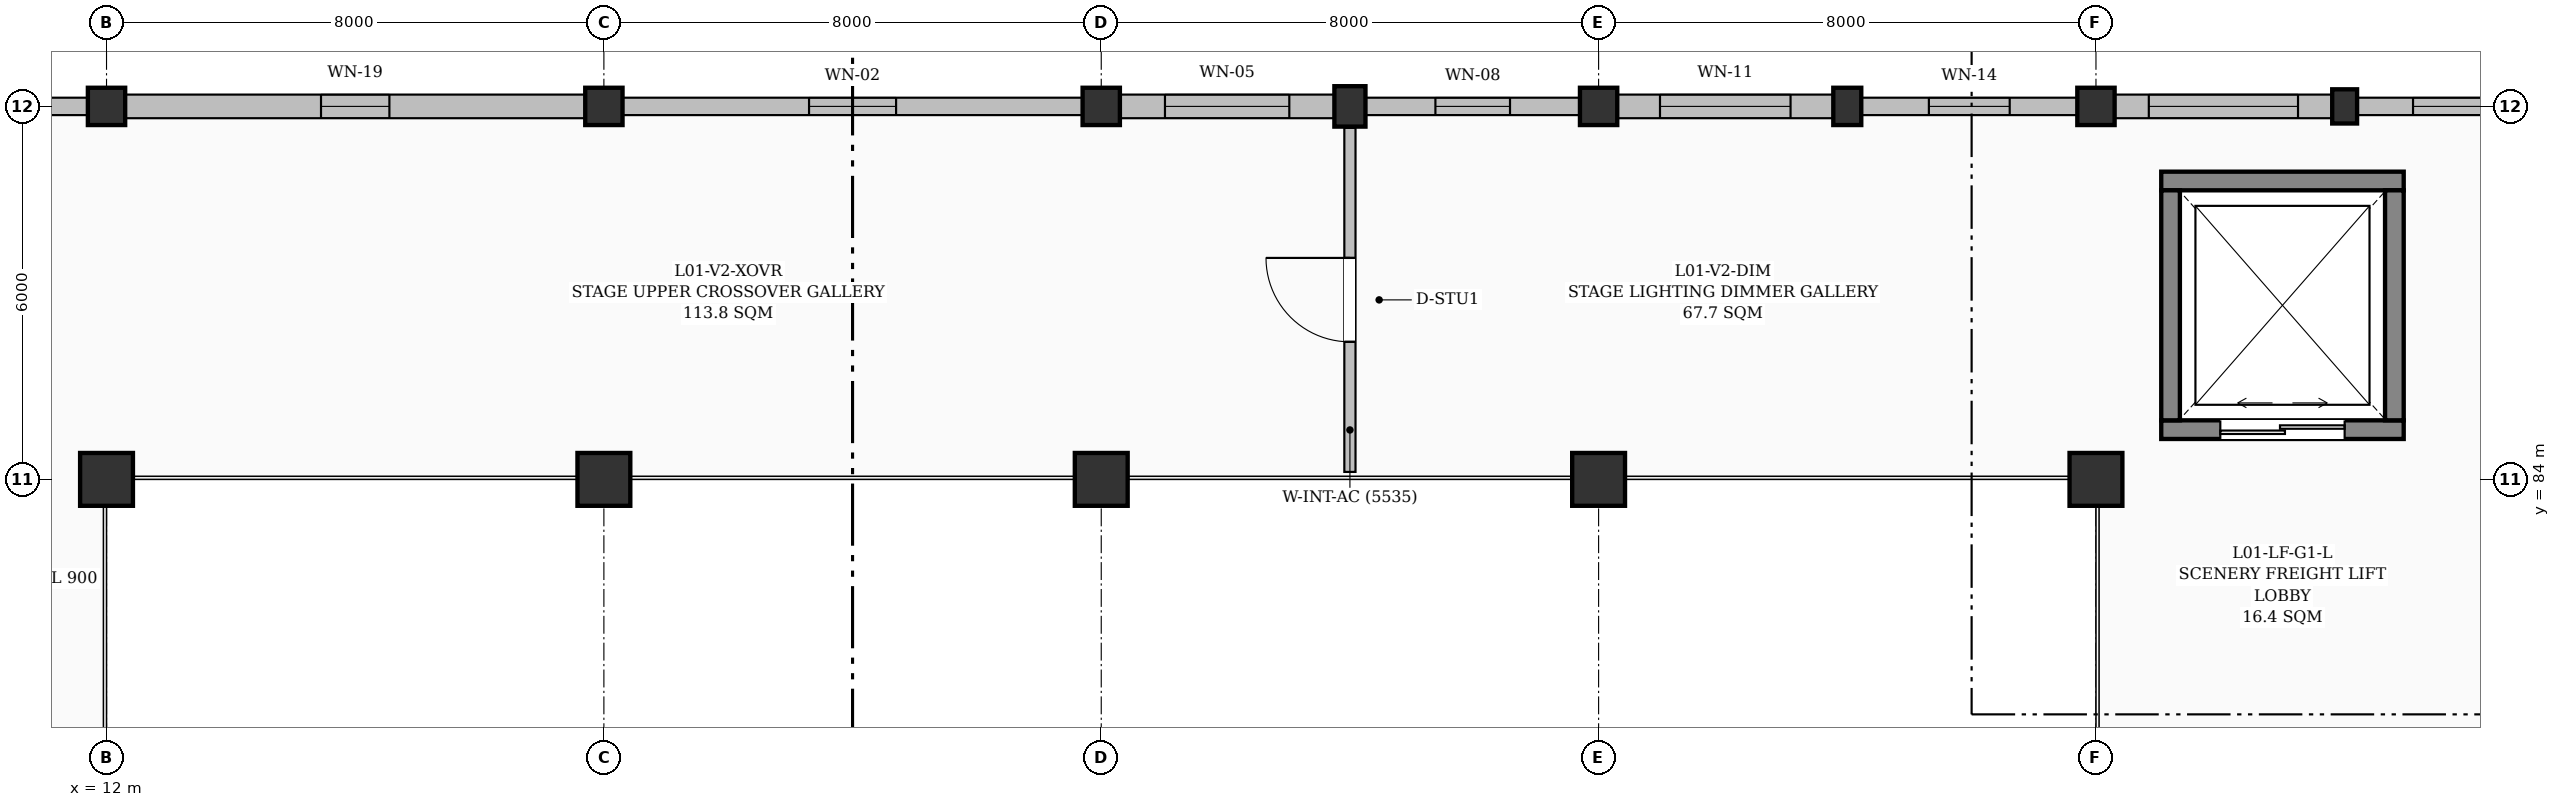
"""IFC4 building model, lengths in metres.
Left out: names, types, materials, properties, quantities, classifications, styles, units other than length and angle.
Written with IfcOpenShell. Run it as: python <this file> out.ifc"""

import sys

from ifc_helpers import new_model, si_unit, direction, frame, frame_2d, origin, origin_2d, place, context, subcontext, project, spatial, rectangle, extrude, element, fill, save


model = new_model("IFC4")
c1 = context("Model", 3, precision=1e-05, world=origin(), true_north=direction((0.0, 1.0)))
c2 = subcontext(c1, "Body", "Model", "MODEL_VIEW")
j1 = project(units=[si_unit("LENGTHUNIT", "METRE"), si_unit("PLANEANGLEUNIT", "RADIAN")], contexts=[c1])
p1 = place(None, origin())
s1 = spatial("IfcSite", under=j1, at=p1, CompositionType="ELEMENT")
p2 = place(p1, origin())
s2 = spatial("IfcBuilding", under=s1, at=p2, CompositionType="ELEMENT")
p3 = place(p2, frame((0.0, 0.0, 4.8)))
s3 = spatial("IfcBuildingStorey", under=s2, at=p3, CompositionType="ELEMENT", Elevation=4.8)
p4 = place(p3, frame((12.0, 84.0, 0.0), z_axis=(0.0, 0.0, 1.0), x_axis=(1.0, 0.0, 0.0)))
e1 = element("IfcColumn", 1, at=p4, inside=s3, PredefinedType="COLUMN", context=c2, shape_type="SweptSolid", body=[
    extrude(rectangle(XDim=0.85, YDim=0.85, at=origin_2d()), origin(), (0.0, 0.0, 1.0), 4.5),
])
p5 = place(p3, frame((12.0, 90.0, 0.0), z_axis=(0.0, 0.0, 1.0), x_axis=(1.0, 0.0, 0.0)))
e2 = element("IfcColumn", 2, at=p5, inside=s3, PredefinedType="COLUMN", context=c2, shape_type="SweptSolid", body=[
    extrude(rectangle(XDim=0.6, YDim=0.6, at=origin_2d()), origin(), (0.0, 0.0, 1.0), 4.5),
])
p6 = place(p3, frame((20.0, 84.0, 0.0), z_axis=(0.0, 0.0, 1.0), x_axis=(1.0, 0.0, 0.0)))
e3 = element("IfcColumn", 3, at=p6, inside=s3, PredefinedType="COLUMN", context=c2, shape_type="SweptSolid", body=[
    extrude(rectangle(XDim=0.85, YDim=0.85, at=origin_2d()), origin(), (0.0, 0.0, 1.0), 4.5),
])
p7 = place(p3, frame((20.0, 90.0, 0.0), z_axis=(0.0, 0.0, 1.0), x_axis=(1.0, 0.0, 0.0)))
e4 = element("IfcColumn", 4, at=p7, inside=s3, PredefinedType="COLUMN", context=c2, shape_type="SweptSolid", body=[
    extrude(rectangle(XDim=0.6, YDim=0.6, at=origin_2d()), origin(), (0.0, 0.0, 1.0), 4.5),
])
p8 = place(p3, frame((28.0, 84.0, 0.0), z_axis=(0.0, 0.0, 1.0), x_axis=(1.0, 0.0, 0.0)))
e5 = element("IfcColumn", 5, at=p8, inside=s3, PredefinedType="COLUMN", context=c2, shape_type="SweptSolid", body=[
    extrude(rectangle(XDim=0.85, YDim=0.85, at=origin_2d()), origin(), (0.0, 0.0, 1.0), 4.5),
])
p9 = place(p3, frame((28.0, 90.0, 0.0), z_axis=(0.0, 0.0, 1.0), x_axis=(1.0, 0.0, 0.0)))
e6 = element("IfcColumn", 6, at=p9, inside=s3, PredefinedType="COLUMN", context=c2, shape_type="SweptSolid", body=[
    extrude(rectangle(XDim=0.6, YDim=0.6, at=origin_2d()), origin(), (0.0, 0.0, 1.0), 4.5),
])
p10 = place(p3, frame((32.0, 90.0, 0.0), z_axis=(0.0, 0.0, 1.0), x_axis=(1.0, 0.0, 0.0)))
e7 = element("IfcColumn", 7, at=p10, inside=s3, PredefinedType="PILASTER", context=c2, shape_type="SweptSolid", body=[
    extrude(rectangle(XDim=0.5, YDim=0.65, at=origin_2d()), origin(), (0.0, 0.0, 1.0), 4.5),
])
p11 = place(p3, frame((36.0, 84.0, 0.0), z_axis=(0.0, 0.0, 1.0), x_axis=(1.0, 0.0, 0.0)))
e8 = element("IfcColumn", 8, at=p11, inside=s3, PredefinedType="COLUMN", context=c2, shape_type="SweptSolid", body=[
    extrude(rectangle(XDim=0.85, YDim=0.85, at=origin_2d()), origin(), (0.0, 0.0, 1.0), 4.5),
])
p12 = place(p3, frame((36.0, 90.0, 0.0), z_axis=(0.0, 0.0, 1.0), x_axis=(1.0, 0.0, 0.0)))
e9 = element("IfcColumn", 9, at=p12, inside=s3, PredefinedType="COLUMN", context=c2, shape_type="SweptSolid", body=[
    extrude(rectangle(XDim=0.6, YDim=0.6, at=origin_2d()), origin(), (0.0, 0.0, 1.0), 4.5),
])
p13 = place(p3, frame((40.0, 90.0, 0.0), z_axis=(0.0, 0.0, 1.0), x_axis=(1.0, 0.0, 0.0)))
e10 = element("IfcColumn", 10, at=p13, inside=s3, PredefinedType="PILASTER", context=c2, shape_type="SweptSolid", body=[
    extrude(rectangle(XDim=0.45, YDim=0.6, at=origin_2d()), origin(), (0.0, 0.0, 1.0), 4.5),
])
p14 = place(p3, frame((44.0, 84.0, 0.0), z_axis=(0.0, 0.0, 1.0), x_axis=(1.0, 0.0, 0.0)))
e11 = element("IfcColumn", 11, at=p14, inside=s3, PredefinedType="COLUMN", context=c2, shape_type="SweptSolid", body=[
    extrude(rectangle(XDim=0.85, YDim=0.85, at=origin_2d()), origin(), (0.0, 0.0, 1.0), 4.5),
])
p15 = place(p3, frame((44.0, 90.0, 0.0), z_axis=(0.0, 0.0, 1.0), x_axis=(1.0, 0.0, 0.0)))
e12 = element("IfcColumn", 12, at=p15, inside=s3, PredefinedType="COLUMN", context=c2, shape_type="SweptSolid", body=[
    extrude(rectangle(XDim=0.6, YDim=0.6, at=origin_2d()), origin(), (0.0, 0.0, 1.0), 4.5),
])
p16 = place(p3, frame((48.0, 90.0, 0.0), z_axis=(0.0, 0.0, 1.0), x_axis=(1.0, 0.0, 0.0)))
e13 = element("IfcColumn", 13, at=p16, inside=s3, PredefinedType="PILASTER", context=c2, shape_type="SweptSolid", body=[
    extrude(rectangle(XDim=0.4, YDim=0.55, at=origin_2d()), origin(), (0.0, 0.0, 1.0), 4.5),
])
p17 = place(p3, frame((8.25, 90.0, 0.0), z_axis=(0.0, 0.0, 1.0), x_axis=(1.0, 0.0, 0.0)))
e14 = element("IfcWall", 14, at=p17, inside=s3, PredefinedType="SOLIDWALL", context=c2, shape_type="SweptSolid", body=[
    extrude(rectangle(XDim=3.45, YDim=0.28, at=frame_2d((1.725, 0.0))), origin(), (0.0, 0.0, 1.0), 3.685),
])
p18 = place(p17, frame((0.725, 0.0, 0.95)))
e15 = element("IfcOpeningElement", 15, at=p18, cuts=e14, PredefinedType="OPENING", context=c2, shape_type="SweptSolid", body=[
    extrude(rectangle(XDim=2.0, YDim=1.2, at=frame_2d((1.0, 0.6))), frame((0.0, 0.15, 0.0), z_axis=(0.0, -1.0, 0.0), x_axis=(1.0, 0.0, 0.0)), (0.0, 0.0, 1.0), 0.3),
])
p19 = place(p3, frame((12.3, 90.0, 0.0), z_axis=(0.0, 0.0, 1.0), x_axis=(1.0, 0.0, 0.0)))
e16 = element("IfcWall", 16, at=p19, inside=s3, PredefinedType="SOLIDWALL", context=c2, shape_type="SweptSolid", body=[
    extrude(rectangle(XDim=7.4, YDim=0.38, at=frame_2d((3.7, 0.0))), origin(), (0.0, 0.0, 1.0), 3.635),
])
p20 = place(p19, frame((3.15, 0.0, 0.95)))
e17 = element("IfcOpeningElement", 17, at=p20, cuts=e16, PredefinedType="OPENING", context=c2, shape_type="SweptSolid", body=[
    extrude(rectangle(XDim=1.1, YDim=2.0, at=frame_2d((0.55, 1.0))), frame((0.0, 0.2, 0.0), z_axis=(0.0, -1.0, 0.0), x_axis=(1.0, 0.0, 0.0)), (0.0, 0.0, 1.0), 0.4),
])
p21 = place(p3, frame((20.3, 90.0, 0.0), z_axis=(0.0, 0.0, 1.0), x_axis=(1.0, 0.0, 0.0)))
e18 = element("IfcWall", 18, at=p21, inside=s3, PredefinedType="SOLIDWALL", context=c2, shape_type="SweptSolid", body=[
    extrude(rectangle(XDim=7.4, YDim=0.28, at=frame_2d((3.7, 0.0))), origin(), (0.0, 0.0, 1.0), 3.935),
])
p22 = place(p21, frame((3.0, 0.0, 0.95)))
e19 = element("IfcOpeningElement", 19, at=p22, cuts=e18, PredefinedType="OPENING", context=c2, shape_type="SweptSolid", body=[
    extrude(rectangle(XDim=1.4, YDim=1.8, at=frame_2d((0.7, 0.9))), frame((0.0, 0.15, 0.0), z_axis=(0.0, -1.0, 0.0), x_axis=(1.0, 0.0, 0.0)), (0.0, 0.0, 1.0), 0.3),
])
p23 = place(p3, frame((28.3, 90.0, 0.0), z_axis=(0.0, 0.0, 1.0), x_axis=(1.0, 0.0, 0.0)))
e20 = element("IfcWall", 20, at=p23, inside=s3, PredefinedType="SOLIDWALL", context=c2, shape_type="SweptSolid", body=[
    extrude(rectangle(XDim=3.45, YDim=0.38, at=frame_2d((1.725, 0.0))), origin(), (0.0, 0.0, 1.0), 3.735),
])
p24 = place(p23, frame((0.725, 0.0, 0.95)))
e21 = element("IfcOpeningElement", 21, at=p24, cuts=e20, PredefinedType="OPENING", context=c2, shape_type="SweptSolid", body=[
    extrude(rectangle(XDim=2.0, YDim=1.8, at=frame_2d((1.0, 0.9))), frame((0.0, 0.2, 0.0), z_axis=(0.0, -1.0, 0.0), x_axis=(1.0, 0.0, 0.0)), (0.0, 0.0, 1.0), 0.4),
])
p25 = place(p3, frame((32.25, 90.0, 0.0), z_axis=(0.0, 0.0, 1.0), x_axis=(1.0, 0.0, 0.0)))
e22 = element("IfcWall", 22, at=p25, inside=s3, PredefinedType="SOLIDWALL", context=c2, shape_type="SweptSolid", body=[
    extrude(rectangle(XDim=3.45, YDim=0.28, at=frame_2d((1.725, 0.0))), origin(), (0.0, 0.0, 1.0), 3.735),
])
p26 = place(p25, frame((1.125, 0.0, 0.95)))
e23 = element("IfcOpeningElement", 23, at=p26, cuts=e22, PredefinedType="OPENING", context=c2, shape_type="SweptSolid", body=[
    extrude(rectangle(XDim=1.2, YDim=1.5, at=frame_2d((0.6, 0.75))), frame((0.0, 0.15, 0.0), z_axis=(0.0, -1.0, 0.0), x_axis=(1.0, 0.0, 0.0)), (0.0, 0.0, 1.0), 0.3),
])
p27 = place(p3, frame((36.3, 90.0, 0.0), z_axis=(0.0, 0.0, 1.0), x_axis=(1.0, 0.0, 0.0)))
e24 = element("IfcWall", 24, at=p27, inside=s3, PredefinedType="SOLIDWALL", context=c2, shape_type="SweptSolid", body=[
    extrude(rectangle(XDim=3.475, YDim=0.38, at=frame_2d((1.737, 0.0))), origin(), (0.0, 0.0, 1.0), 3.685),
])
p28 = place(p27, frame((0.688, 0.0, 0.95)))
e25 = element("IfcOpeningElement", 25, at=p28, cuts=e24, PredefinedType="OPENING", context=c2, shape_type="SweptSolid", body=[
    extrude(rectangle(XDim=2.1, YDim=1.5, at=frame_2d((1.05, 0.75))), frame((0.0, 0.2, 0.0), z_axis=(0.0, -1.0, 0.0), x_axis=(1.0, 0.0, 0.0)), (0.0, 0.0, 1.0), 0.4),
])
p29 = place(p3, frame((40.225, 90.0, 0.0), z_axis=(0.0, 0.0, 1.0), x_axis=(1.0, 0.0, 0.0)))
e26 = element("IfcWall", 26, at=p29, inside=s3, PredefinedType="SOLIDWALL", context=c2, shape_type="SweptSolid", body=[
    extrude(rectangle(XDim=3.475, YDim=0.28, at=frame_2d((1.737, 0.0))), origin(), (0.0, 0.0, 1.0), 3.685),
])
p30 = place(p29, frame((1.087, 0.0, 0.95)))
e27 = element("IfcOpeningElement", 27, at=p30, cuts=e26, PredefinedType="OPENING", context=c2, shape_type="SweptSolid", body=[
    extrude(rectangle(XDim=1.3, YDim=1.4, at=frame_2d((0.65, 0.7))), frame((0.0, 0.15, 0.0), z_axis=(0.0, -1.0, 0.0), x_axis=(1.0, 0.0, 0.0)), (0.0, 0.0, 1.0), 0.3),
])
p31 = place(p3, frame((44.3, 90.0, 0.0), z_axis=(0.0, 0.0, 1.0), x_axis=(1.0, 0.0, 0.0)))
e28 = element("IfcWall", 28, at=p31, inside=s3, PredefinedType="SOLIDWALL", context=c2, shape_type="SweptSolid", body=[
    extrude(rectangle(XDim=3.5, YDim=0.38, at=frame_2d((1.75, 0.0))), origin(), (0.0, 0.0, 1.0), 3.635),
])
p32 = place(p31, frame((0.55, 0.0, 0.95)))
e29 = element("IfcOpeningElement", 29, at=p32, cuts=e28, PredefinedType="OPENING", context=c2, shape_type="SweptSolid", body=[
    extrude(rectangle(XDim=2.4, YDim=1.2, at=frame_2d((1.2, 0.6))), frame((0.0, 0.2, 0.0), z_axis=(0.0, -1.0, 0.0), x_axis=(1.0, 0.0, 0.0)), (0.0, 0.0, 1.0), 0.4),
])
p33 = place(p3, frame((48.2, 90.0, 0.0), z_axis=(0.0, 0.0, 1.0), x_axis=(1.0, 0.0, 0.0)))
e30 = element("IfcWall", 30, at=p33, inside=s3, PredefinedType="SOLIDWALL", context=c2, shape_type="SweptSolid", body=[
    extrude(rectangle(XDim=3.5, YDim=0.28, at=frame_2d((1.75, 0.0))), origin(), (0.0, 0.0, 1.0), 3.635),
])
p34 = place(p33, frame((0.9, 0.0, 0.95)))
e31 = element("IfcOpeningElement", 31, at=p34, cuts=e30, PredefinedType="OPENING", context=c2, shape_type="SweptSolid", body=[
    extrude(rectangle(XDim=1.7, YDim=2.0, at=frame_2d((0.85, 1.0))), frame((0.0, 0.15, 0.0), z_axis=(0.0, -1.0, 0.0), x_axis=(1.0, 0.0, 0.0)), (0.0, 0.0, 1.0), 0.3),
])
p35 = place(p3, frame((45.05, 84.8, 0.0), z_axis=(0.0, 0.0, 1.0), x_axis=(1.0, 0.0, 0.0)))
e32 = element("IfcWall", 32, at=p35, inside=s3, PredefinedType="SHEAR", context=c2, shape_type="SweptSolid", body=[
    extrude(rectangle(XDim=3.9, YDim=0.3, at=frame_2d((1.95, 0.0))), origin(), (0.0, 0.0, 1.0), 4.25),
])
p36 = place(p35, frame((0.95, 0.0, 0.0)))
e33 = element("IfcOpeningElement", 33, at=p36, cuts=e32, PredefinedType="OPENING", context=c2, shape_type="SweptSolid", body=[
    extrude(rectangle(XDim=2.0, YDim=2.4, at=frame_2d((1.0, 1.2))), frame((0.0, 0.16, 0.0), z_axis=(0.0, -1.0, 0.0), x_axis=(1.0, 0.0, 0.0)), (0.0, 0.0, 1.0), 0.32),
])
p37 = place(p3, frame((48.95, 88.8, 0.0), z_axis=(0.0, 0.0, 1.0), x_axis=(-1.0, 0.0, 0.0)))
e34 = element("IfcWall", 34, at=p37, inside=s3, PredefinedType="SHEAR", context=c2, shape_type="SweptSolid", body=[
    extrude(rectangle(XDim=3.9, YDim=0.3, at=frame_2d((1.95, 0.0))), origin(), (0.0, 0.0, 1.0), 4.25),
])
for number, where, z_axis, x_axis in (
    (35, (45.2, 84.95, 0.0), (0.0, 0.0, 1.0), (0.0, 1.0, 0.0)),
    (36, (48.8, 88.65, 0.0), (0.0, 0.0, 1.0), (0.0, -1.0, 0.0)),
):
    element("IfcWall", number, at=place(p3, frame(where, z_axis=z_axis, x_axis=x_axis)), inside=s3, PredefinedType="SHEAR", context=c2, shape_type="SweptSolid", body=[
        extrude(rectangle(XDim=3.7, YDim=0.3, at=frame_2d((1.85, 0.0))), origin(), (0.0, 0.0, 1.0), 4.25),
    ])
p38 = place(p3, frame((32.0, 84.12, 0.0), z_axis=(0.0, 0.0, 1.0), x_axis=(0.0, 1.0, 0.0)))
e37 = element("IfcWall", 37, at=p38, inside=s3, PredefinedType="PARTITIONING", context=c2, shape_type="SweptSolid", body=[
    extrude(rectangle(XDim=5.535, YDim=0.18, at=frame_2d((2.768, 0.0))), origin(), (0.0, 0.0, 1.0), 4.25),
])
p39 = place(p38, frame((2.093, 0.0, 0.0)))
e38 = element("IfcOpeningElement", 38, at=p39, cuts=e37, PredefinedType="OPENING", context=c2, shape_type="SweptSolid", body=[
    extrude(rectangle(XDim=1.35, YDim=2.2, at=frame_2d((0.675, 1.1))), frame((0.0, 0.1, 0.0), z_axis=(0.0, -1.0, 0.0), x_axis=(1.0, 0.0, 0.0)), (0.0, 0.0, 1.0), 0.2),
])
p40 = place(p20, origin())
e39 = element("IfcWindow", 39, at=p40, inside=s3, PartitioningType="SINGLE_PANEL", PredefinedType="WINDOW", context=c2, shape_type="SweptSolid", body=[
    extrude(rectangle(XDim=1.1, YDim=2.0, at=frame_2d((0.55, 1.0))), frame((0.0, 0.03, 0.0), z_axis=(0.0, -1.0, 0.0), x_axis=(1.0, 0.0, 0.0)), (0.0, 0.0, 1.0), 0.06),
])
fill(e17, e39)
p41 = place(p22, origin())
e40 = element("IfcWindow", 40, at=p41, inside=s3, PartitioningType="DOUBLE_PANEL_VERTICAL", PredefinedType="WINDOW", context=c2, shape_type="SweptSolid", body=[
    extrude(rectangle(XDim=1.4, YDim=1.8, at=frame_2d((0.7, 0.9))), frame((0.0, 0.03, 0.0), z_axis=(0.0, -1.0, 0.0), x_axis=(1.0, 0.0, 0.0)), (0.0, 0.0, 1.0), 0.06),
])
fill(e19, e40)
p42 = place(p24, origin())
e41 = element("IfcWindow", 41, at=p42, inside=s3, PartitioningType="TRIPLE_PANEL_VERTICAL", PredefinedType="WINDOW", context=c2, shape_type="SweptSolid", body=[
    extrude(rectangle(XDim=2.0, YDim=1.8, at=frame_2d((1.0, 0.9))), frame((0.0, 0.03, 0.0), z_axis=(0.0, -1.0, 0.0), x_axis=(1.0, 0.0, 0.0)), (0.0, 0.0, 1.0), 0.06),
])
fill(e21, e41)
p43 = place(p26, origin())
e42 = element("IfcWindow", 42, at=p43, inside=s3, PartitioningType="SINGLE_PANEL", PredefinedType="WINDOW", context=c2, shape_type="SweptSolid", body=[
    extrude(rectangle(XDim=1.2, YDim=1.5, at=frame_2d((0.6, 0.75))), frame((0.0, 0.03, 0.0), z_axis=(0.0, -1.0, 0.0), x_axis=(1.0, 0.0, 0.0)), (0.0, 0.0, 1.0), 0.06),
])
fill(e23, e42)
p44 = place(p28, origin())
e43 = element("IfcWindow", 43, at=p44, inside=s3, PartitioningType="TRIPLE_PANEL_VERTICAL", PredefinedType="WINDOW", context=c2, shape_type="SweptSolid", body=[
    extrude(rectangle(XDim=2.1, YDim=1.5, at=frame_2d((1.05, 0.75))), frame((0.0, 0.03, 0.0), z_axis=(0.0, -1.0, 0.0), x_axis=(1.0, 0.0, 0.0)), (0.0, 0.0, 1.0), 0.06),
])
fill(e25, e43)
p45 = place(p30, origin())
e44 = element("IfcWindow", 44, at=p45, inside=s3, PartitioningType="SINGLE_PANEL", PredefinedType="WINDOW", context=c2, shape_type="SweptSolid", body=[
    extrude(rectangle(XDim=1.3, YDim=1.4, at=frame_2d((0.65, 0.7))), frame((0.0, 0.03, 0.0), z_axis=(0.0, -1.0, 0.0), x_axis=(1.0, 0.0, 0.0)), (0.0, 0.0, 1.0), 0.06),
])
fill(e27, e44)
p46 = place(p32, origin())
e45 = element("IfcWindow", 45, at=p46, inside=s3, PartitioningType="TRIPLE_PANEL_HORIZONTAL", PredefinedType="WINDOW", context=c2, shape_type="SweptSolid", body=[
    extrude(rectangle(XDim=2.4, YDim=1.2, at=frame_2d((1.2, 0.6))), frame((0.0, 0.03, 0.0), z_axis=(0.0, -1.0, 0.0), x_axis=(1.0, 0.0, 0.0)), (0.0, 0.0, 1.0), 0.06),
])
fill(e29, e45)
p47 = place(p34, origin())
e46 = element("IfcWindow", 46, at=p47, inside=s3, PartitioningType="DOUBLE_PANEL_VERTICAL", PredefinedType="WINDOW", context=c2, shape_type="SweptSolid", body=[
    extrude(rectangle(XDim=1.7, YDim=2.0, at=frame_2d((0.85, 1.0))), frame((0.0, 0.03, 0.0), z_axis=(0.0, -1.0, 0.0), x_axis=(1.0, 0.0, 0.0)), (0.0, 0.0, 1.0), 0.06),
])
fill(e31, e46)
p48 = place(p36, origin())
e47 = element("IfcDoor", 47, at=p48, inside=s3, OperationType="DOUBLE_DOOR_SLIDING", PredefinedType="DOOR", context=c2, shape_type="SweptSolid", body=[
    extrude(rectangle(XDim=2.0, YDim=2.4, at=frame_2d((1.0, 1.2))), frame((0.0, 0.025, 0.0), z_axis=(0.0, -1.0, 0.0), x_axis=(1.0, 0.0, 0.0)), (0.0, 0.0, 1.0), 0.05),
])
fill(e33, e47)
p49 = place(p39, origin())
e48 = element("IfcDoor", 48, at=p49, inside=s3, OperationType="SINGLE_SWING_RIGHT", PredefinedType="DOOR", context=c2, shape_type="SweptSolid", body=[
    extrude(rectangle(XDim=1.35, YDim=2.2, at=frame_2d((0.675, 1.1))), frame((0.0, 0.025, 0.0), z_axis=(0.0, -1.0, 0.0), x_axis=(1.0, 0.0, 0.0)), (0.0, 0.0, 1.0), 0.05),
])
fill(e38, e48)
save(model, sys.argv[1])
